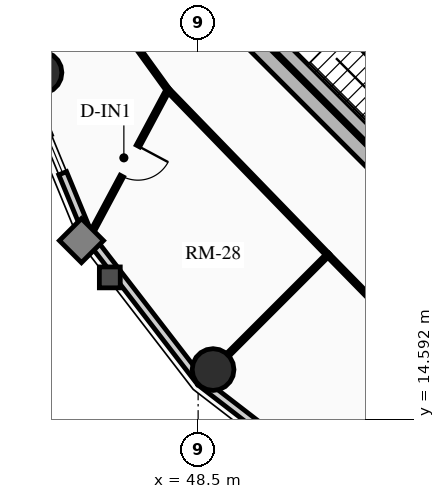
"""IFC4 building model, lengths in metres.
Left out: names, types, materials, properties, quantities, classifications, styles, units other than length and angle.
Written with IfcOpenShell. Run it as: python <this file> out.ifc"""

import sys

from ifc_helpers import new_model, si_unit, direction, frame, frame_2d, origin, origin_2d, place, context, subcontext, project, spatial, rectangle, circle, extrude, source, transform, mapped, element, fill, save


model = new_model("IFC4")
c1 = context("Model", 3, precision=1e-05, world=origin(), true_north=direction((0.0, 1.0)))
c2 = subcontext(c1, "Body", "Model", "MODEL_VIEW")
j1 = project(units=[si_unit("LENGTHUNIT", "METRE"), si_unit("PLANEANGLEUNIT", "RADIAN")], contexts=[c1])
p1 = place(None, origin())
s1 = spatial("IfcSite", under=j1, at=p1, CompositionType="ELEMENT")
p2 = place(p1, origin())
s2 = spatial("IfcBuilding", under=s1, at=p2, CompositionType="ELEMENT")
p3 = place(p2, frame((0.0, 0.0, 232.45)))
s3 = spatial("IfcBuildingStorey", under=s2, at=p3, CompositionType="ELEMENT", Elevation=232.45)
p4 = place(p3, frame((58.702, 15.732, 0.0), z_axis=(0.0, 0.0, 1.0), x_axis=(-0.707106781187, 0.707106781187, 0.0)))
e1 = element("IfcWall", 1, at=p4, inside=s3, PredefinedType="SHEAR", context=c2, shape_type="SweptSolid", body=[
    extrude(rectangle(XDim=14.1, YDim=0.4, at=frame_2d((7.05, 0.0))), origin(), (0.0, 0.0, 1.0), 3.2),
])
p5 = place(p3, frame((61.06, 18.373, 0.0), z_axis=(0.0, 0.0, 1.0), x_axis=(-0.707106781187, 0.707106781187, 0.0)))
e2 = element("IfcWall", 2, at=p5, inside=s3, PredefinedType="SHEAR", context=c2, shape_type="SweptSolid", body=[
    extrude(rectangle(XDim=13.7, YDim=0.35, at=frame_2d((6.85, 0.0))), origin(), (0.0, 0.0, 1.0), 3.2),
])
m1 = source(origin(), c2, "Body", "SweptSolid", [
    extrude(rectangle(XDim=1.1, YDim=2.015, at=frame_2d((0.55, 1.007))), frame((0.0, 0.185, 0.0), z_axis=(0.0, -1.0, 0.0), x_axis=(1.0, 0.0, 0.0)), (0.0, 0.0, 1.0), 0.37),
])
p6 = place(p5, frame((4.85, 0.0, 0.0)))
e3 = element("IfcOpeningElement", 3, at=p6, cuts=e2, PredefinedType="OPENING", context=c2, shape_type="MappedRepresentation", body=[
    mapped(m1, transform((0.0, 0.0, 0.0), x_axis=(1.0, 0.0, 0.0), y_axis=(0.0, 1.0, 0.0), z_axis=(0.0, 0.0, 1.0), scale=1.0)),
])
p7 = place(p5, frame((0.625, 0.0, 0.0)))
e4 = element("IfcOpeningElement", 4, at=p7, cuts=e2, PredefinedType="OPENING", context=c2, shape_type="MappedRepresentation", body=[
    mapped(m1, transform((0.0, 0.0, 0.0), x_axis=(1.0, 0.0, 0.0), y_axis=(0.0, 1.0, 0.0), z_axis=(0.0, 0.0, 1.0), scale=1.0)),
])
p8 = place(p5, frame((2.625, 0.0, 0.0)))
e5 = element("IfcOpeningElement", 5, at=p8, cuts=e2, PredefinedType="OPENING", context=c2, shape_type="MappedRepresentation", body=[
    mapped(m1, transform((0.0, 0.0, 0.0), x_axis=(1.0, 0.0, 0.0), y_axis=(0.0, 1.0, 0.0), z_axis=(0.0, 0.0, 1.0), scale=1.0)),
])
m2 = source(origin(), c2, "Body", "SweptSolid", [
    extrude(rectangle(XDim=1.15, YDim=2.02, at=frame_2d((0.575, 1.01))), frame((0.0, 0.185, 0.0), z_axis=(0.0, -1.0, 0.0), x_axis=(1.0, 0.0, 0.0)), (0.0, 0.0, 1.0), 0.37),
])
p9 = place(p5, frame((7.27, 0.0, 0.0)))
e6 = element("IfcOpeningElement", 6, at=p9, cuts=e2, PredefinedType="OPENING", context=c2, shape_type="MappedRepresentation", body=[
    mapped(m2, transform((0.0, 0.0, 0.0), x_axis=(1.0, 0.0, 0.0), y_axis=(0.0, 1.0, 0.0), z_axis=(0.0, 0.0, 1.0), scale=1.0)),
])
p10 = place(p3, frame((53.922, 21.141, 0.0), z_axis=(0.0, 0.0, 1.0), x_axis=(-0.707106781187, 0.707106781187, 0.0)))
e7 = element("IfcWall", 7, at=p10, inside=s3, PredefinedType="SHEAR", context=c2, shape_type="SweptSolid", body=[
    extrude(rectangle(XDim=6.695, YDim=0.35, at=frame_2d((3.348, 0.0))), origin(), (0.0, 0.0, 1.0), 3.2),
])
for number, where, z_axis, x_axis in (
    (8, (44.365, 23.709, 0.0), (0.0, 0.0, 1.0), (1.0, 0.0, 0.0)),
    (9, (48.893, 15.893, 0.0), (0.0, 0.0, 1.0), (1.0, 0.0, 0.0)),
):
    element("IfcColumn", number, at=place(p3, frame(where, z_axis=z_axis, x_axis=x_axis)), inside=s3, PredefinedType="USERDEFINED", context=c2, shape_type="SweptSolid", body=[
        extrude(circle(Radius=0.55, at=origin_2d()), origin(), (0.0, 0.0, 1.0), 3.2),
    ])
p11 = place(p3, frame((45.626, 19.387, 0.0), z_axis=(0.0, 0.0, 1.0), x_axis=(-0.381309704956, 0.924447353237, 0.0)))
e10 = element("IfcWall", 10, at=p11, inside=s3, PredefinedType="SOLIDWALL", context=c2, shape_type="SweptSolid", body=[
    extrude(rectangle(XDim=4.671, YDim=0.22, at=frame_2d((2.335, 0.0))), origin(), (0.0, 0.0, 1.0), 2.402),
])
m3 = source(origin(), c2, "Body", "SweptSolid", [
    extrude(rectangle(XDim=1.05, YDim=1.3, at=frame_2d((0.525, 0.65))), frame((0.0, 0.12, 0.0), z_axis=(0.0, -1.0, 0.0), x_axis=(1.0, 0.0, 0.0)), (0.0, 0.0, 1.0), 0.24),
])
p12 = place(p11, frame((1.81, 0.0, 0.65)))
e11 = element("IfcOpeningElement", 11, at=p12, cuts=e10, PredefinedType="OPENING", context=c2, shape_type="MappedRepresentation", body=[
    mapped(m3, transform((0.0, 0.0, 0.0), x_axis=(1.0, 0.0, 0.0), y_axis=(0.0, 1.0, 0.0), z_axis=(0.0, 0.0, 1.0), scale=1.0)),
])
p13 = place(p3, frame((48.569, 15.569, 0.0), z_axis=(0.0, 0.0, 1.0), x_axis=(-0.610523083886, 0.791998462147, 0.0)))
e12 = element("IfcWall", 12, at=p13, inside=s3, PredefinedType="SOLIDWALL", context=c2, shape_type="SweptSolid", body=[
    extrude(rectangle(XDim=4.82, YDim=0.22, at=frame_2d((2.41, 0.0))), origin(), (0.0, 0.0, 1.0), 2.402),
])
p14 = place(p3, frame((52.387, 12.626, 0.0), z_axis=(0.0, 0.0, 1.0), x_axis=(-0.791998462147, 0.610523083886, 0.0)))
e13 = element("IfcWall", 13, at=p14, inside=s3, PredefinedType="SOLIDWALL", context=c2, shape_type="SweptSolid", body=[
    extrude(rectangle(XDim=4.82, YDim=0.22, at=frame_2d((2.41, 0.0))), origin(), (0.0, 0.0, 1.0), 2.402),
])
p15 = place(p14, frame((1.885, 0.0, 0.65)))
e14 = element("IfcOpeningElement", 14, at=p15, cuts=e13, PredefinedType="OPENING", context=c2, shape_type="MappedRepresentation", body=[
    mapped(m3, transform((0.0, 0.0, 0.0), x_axis=(1.0, 0.0, 0.0), y_axis=(0.0, 1.0, 0.0), z_axis=(0.0, 0.0, 1.0), scale=1.0)),
])
p16 = place(p3, frame((46.795, 24.513, 0.0), z_axis=(0.0, 0.0, 1.0), x_axis=(0.585628197524, -0.810579801294, 0.0)))
e15 = element("IfcWall", 15, at=p16, inside=s3, PredefinedType="MOVABLE", context=c2, shape_type="SweptSolid", body=[
    extrude(rectangle(XDim=1.554, YDim=0.1, at=frame_2d((0.777, 0.0))), origin(), (0.0, 0.0, 1.0), 2.335),
])
p17 = place(p3, frame((47.706, 23.253, 0.0), z_axis=(0.0, 0.0, 1.0), x_axis=(0.696179266346, -0.717867974707, 0.0)))
e16 = element("IfcWall", 16, at=p17, inside=s3, PredefinedType="MOVABLE", context=c2, shape_type="SweptSolid", body=[
    extrude(rectangle(XDim=6.045, YDim=0.1, at=frame_2d((3.022, 0.0))), origin(), (0.0, 0.0, 1.0), 2.335),
])
p18 = place(p3, frame((51.914, 18.914, 0.0), z_axis=(0.0, 0.0, 1.0), x_axis=(0.699999313799, -0.714143515465, 0.0)))
e17 = element("IfcWall", 17, at=p18, inside=s3, PredefinedType="MOVABLE", context=c2, shape_type="SweptSolid", body=[
    extrude(rectangle(XDim=6.162, YDim=0.1, at=frame_2d((3.081, 0.0))), origin(), (0.0, 0.0, 1.0), 2.335),
])
m4 = source(origin(), c2, "Body", "SweptSolid", [
    extrude(rectangle(XDim=1.05, YDim=2.015, at=frame_2d((0.525, 1.007))), frame((0.0, 0.06, 0.0), z_axis=(0.0, -1.0, 0.0), x_axis=(1.0, 0.0, 0.0)), (0.0, 0.0, 1.0), 0.12),
])
p19 = place(p18, frame((2.556, 0.0, 0.0)))
e18 = element("IfcOpeningElement", 18, at=p19, cuts=e17, PredefinedType="OPENING", context=c2, shape_type="MappedRepresentation", body=[
    mapped(m4, transform((0.0, 0.0, 0.0), x_axis=(1.0, 0.0, 0.0), y_axis=(0.0, 1.0, 0.0), z_axis=(0.0, 0.0, 1.0), scale=1.0)),
])
p20 = place(p3, frame((51.914, 18.914, 0.0), z_axis=(0.0, 0.0, 1.0), x_axis=(-0.707106781187, -0.707106781187, 0.0)))
e19 = element("IfcWall", 19, at=p20, inside=s3, PredefinedType="MOVABLE", context=c2, shape_type="SweptSolid", body=[
    extrude(rectangle(XDim=4.71, YDim=0.1, at=frame_2d((2.355, 0.0))), origin(), (0.0, 0.0, 1.0), 2.402),
])
p21 = place(p3, frame((47.706, 23.253, 0.0), z_axis=(0.0, 0.0, 1.0), x_axis=(-0.471384756618, -0.881927667799, 0.0)))
e20 = element("IfcWall", 20, at=p21, inside=s3, PredefinedType="MOVABLE", context=c2, shape_type="SweptSolid", body=[
    extrude(rectangle(XDim=4.374, YDim=0.1, at=frame_2d((2.187, 0.0))), origin(), (0.0, 0.0, 1.0), 2.335),
])
m5 = source(origin(), c2, "Body", "SweptSolid", [
    extrude(rectangle(XDim=0.9, YDim=2.005, at=frame_2d((0.45, 1.002))), frame((0.0, 0.06, 0.0), z_axis=(0.0, -1.0, 0.0), x_axis=(1.0, 0.0, 0.0)), (0.0, 0.0, 1.0), 0.12),
])
p22 = place(p21, frame((1.674, 0.0, 0.0)))
e21 = element("IfcOpeningElement", 21, at=p22, cuts=e20, PredefinedType="OPENING", context=c2, shape_type="MappedRepresentation", body=[
    mapped(m5, transform((0.0, 0.0, 0.0), x_axis=(1.0, 0.0, 0.0), y_axis=(0.0, 1.0, 0.0), z_axis=(0.0, 0.0, 1.0), scale=1.0)),
])
m6 = source(origin(), c2, "Body", "SweptSolid", [
    extrude(rectangle(XDim=1.05, YDim=1.3, at=frame_2d((0.525, 0.65))), frame((0.0, 0.03, 0.0), z_axis=(0.0, -1.0, 0.0), x_axis=(1.0, 0.0, 0.0)), (0.0, 0.0, 1.0), 0.06),
])
p23 = place(p12, origin())
e22 = element("IfcWindow", 22, at=p23, inside=s3, PartitioningType="SINGLE_PANEL", PredefinedType="WINDOW", context=c2, shape_type="MappedRepresentation", body=[
    mapped(m6, transform((0.0, 0.0, 0.0), x_axis=(1.0, 0.0, 0.0), y_axis=(0.0, 1.0, 0.0), z_axis=(0.0, 0.0, 1.0), scale=1.0)),
])
fill(e11, e22)
m7 = source(origin(), c2, "Body", "SweptSolid", [
    extrude(rectangle(XDim=0.9, YDim=2.005, at=frame_2d((0.45, 1.002))), frame((0.0, 0.025, 0.0), z_axis=(0.0, -1.0, 0.0), x_axis=(1.0, 0.0, 0.0)), (0.0, 0.0, 1.0), 0.05),
])
p24 = place(p22, origin())
e23 = element("IfcDoor", 23, at=p24, inside=s3, OperationType="SINGLE_SWING_LEFT", PredefinedType="DOOR", context=c2, shape_type="MappedRepresentation", body=[
    mapped(m7, transform((0.0, 0.0, 0.0), x_axis=(1.0, 0.0, 0.0), y_axis=(0.0, 1.0, 0.0), z_axis=(0.0, 0.0, 1.0), scale=1.0)),
])
fill(e21, e23)
save(model, sys.argv[1])
